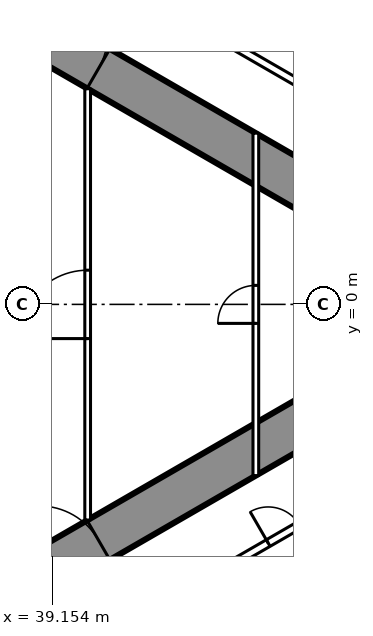
"""IFC4 building model, lengths in metres.
Left out: names, types, materials, properties, quantities, classifications, styles, units other than length and angle.
Written with IfcOpenShell. Run it as: python <this file> out.ifc"""

import sys

from ifc_helpers import new_model, si_unit, direction, frame, frame_2d, origin, place, context, subcontext, project, spatial, rectangle, extrude, element, fill, save


model = new_model("IFC4")
c1 = context("Model", 3, precision=1e-05, world=origin(), true_north=direction((0.0, 1.0)))
c2 = subcontext(c1, "Body", "Model", "MODEL_VIEW")
j1 = project(units=[si_unit("LENGTHUNIT", "METRE"), si_unit("PLANEANGLEUNIT", "RADIAN")], contexts=[c1])
p1 = place(None, origin())
s1 = spatial("IfcSite", under=j1, at=p1, CompositionType="ELEMENT")
p2 = place(p1, origin())
s2 = spatial("IfcBuilding", under=s1, at=p2, CompositionType="ELEMENT")
p3 = place(p2, frame((0.0, 0.0, 233.3)))
s3 = spatial("IfcBuildingStorey", under=s2, at=p3, CompositionType="ELEMENT", Elevation=233.3)
p4 = place(p3, frame((27.2, -13.8, 0.0), z_axis=(0.0, 0.0, 1.0), x_axis=(0.866027159892, 0.499996958321, 0.0)))
e1 = element("IfcWall", 1, at=p4, inside=s3, PredefinedType="SHEAR", context=c2, shape_type="SweptSolid", body=[
    extrude(rectangle(XDim=27.947, YDim=1.2, at=frame_2d((13.973, 0.0))), origin(), (0.0, 0.0, 1.0), 3.6),
])
p5 = place(p4, frame((4.6, 0.0, 0.0)))
e2 = element("IfcOpeningElement", 2, at=p5, cuts=e1, PredefinedType="OPENING", context=c2, shape_type="SweptSolid", body=[
    extrude(rectangle(XDim=1.0, YDim=2.2, at=frame_2d((0.5, 1.1))), frame((0.0, 0.61, 0.0), z_axis=(0.0, -1.0, 0.0), x_axis=(1.0, 0.0, 0.0)), (0.0, 0.0, 1.0), 1.22),
])
p6 = place(p4, frame((13.395, 0.0, 0.0)))
e3 = element("IfcOpeningElement", 3, at=p6, cuts=e1, PredefinedType="OPENING", context=c2, shape_type="SweptSolid", body=[
    extrude(rectangle(XDim=1.8, YDim=2.2, at=frame_2d((0.9, 1.1))), frame((0.0, 0.61, 0.0), z_axis=(0.0, -1.0, 0.0), x_axis=(1.0, 0.0, 0.0)), (0.0, 0.0, 1.0), 1.22),
])
p7 = place(p3, frame((27.2, 13.8, 0.0), z_axis=(0.0, 0.0, 1.0), x_axis=(0.866024515034, -0.500001539357, 0.0)))
e4 = element("IfcWall", 4, at=p7, inside=s3, PredefinedType="SHEAR", context=c2, shape_type="SweptSolid", body=[
    extrude(rectangle(XDim=26.907, YDim=1.2, at=frame_2d((13.454, 0.0))), origin(), (0.0, 0.0, 1.0), 3.6),
])
p8 = place(p7, frame((4.6, 0.0, 0.0)))
e5 = element("IfcOpeningElement", 5, at=p8, cuts=e4, PredefinedType="OPENING", context=c2, shape_type="SweptSolid", body=[
    extrude(rectangle(XDim=1.0, YDim=2.2, at=frame_2d((0.5, 1.1))), frame((0.0, 0.61, 0.0), z_axis=(0.0, -1.0, 0.0), x_axis=(1.0, 0.0, 0.0)), (0.0, 0.0, 1.0), 1.22),
])
p9 = place(p7, frame((13.395, 0.0, 0.0)))
e6 = element("IfcOpeningElement", 6, at=p9, cuts=e4, PredefinedType="OPENING", context=c2, shape_type="SweptSolid", body=[
    extrude(rectangle(XDim=1.8, YDim=2.2, at=frame_2d((0.9, 1.1))), frame((0.0, 0.61, 0.0), z_axis=(0.0, -1.0, 0.0), x_axis=(1.0, 0.0, 0.0)), (0.0, 0.0, 1.0), 1.22),
])
p10 = place(p3, frame((28.959, 15.44, 0.0), z_axis=(0.0, 0.0, 1.0), x_axis=(0.866028936079, -0.499993881836, 0.0)))
e7 = element("IfcWall", 7, at=p10, inside=s3, PredefinedType="PARTITIONING", context=c2, shape_type="SweptSolid", body=[
    extrude(rectangle(XDim=20.503, YDim=0.2, at=frame_2d((10.251, 0.0))), origin(), (0.0, 0.0, 1.0), 3.35),
])
p11 = place(p10, frame((16.137, 0.0, 0.0)))
e8 = element("IfcOpeningElement", 8, at=p11, cuts=e7, PredefinedType="OPENING", context=c2, shape_type="SweptSolid", body=[
    extrude(rectangle(XDim=0.95, YDim=2.2, at=frame_2d((0.475, 1.1))), frame((0.0, 0.11, 0.0), z_axis=(0.0, -1.0, 0.0), x_axis=(1.0, 0.0, 0.0)), (0.0, 0.0, 1.0), 0.22),
])
p12 = place(p10, frame((14.437, 0.0, 0.0)))
e9 = element("IfcOpeningElement", 9, at=p12, cuts=e7, PredefinedType="OPENING", context=c2, shape_type="SweptSolid", body=[
    extrude(rectangle(XDim=0.95, YDim=2.2, at=frame_2d((0.475, 1.1))), frame((0.0, 0.11, 0.0), z_axis=(0.0, -1.0, 0.0), x_axis=(1.0, 0.0, 0.0)), (0.0, 0.0, 1.0), 0.22),
])
p13 = place(p10, frame((2.244, 0.0, 0.0)))
e10 = element("IfcOpeningElement", 10, at=p13, cuts=e7, PredefinedType="OPENING", context=c2, shape_type="SweptSolid", body=[
    extrude(rectangle(XDim=1.8, YDim=2.03, at=frame_2d((0.9, 1.015))), frame((0.0, 0.11, 0.0), z_axis=(0.0, -1.0, 0.0), x_axis=(1.0, 0.0, 0.0)), (0.0, 0.0, 1.0), 0.22),
])
p14 = place(p3, frame((28.959, -15.44, 0.0), z_axis=(0.0, 0.0, 1.0), x_axis=(0.866025204199, 0.500000345692, 0.0)))
e11 = element("IfcWall", 11, at=p14, inside=s3, PredefinedType="PARTITIONING", context=c2, shape_type="SweptSolid", body=[
    extrude(rectangle(XDim=19.646, YDim=0.2, at=frame_2d((9.823, 0.0))), origin(), (0.0, 0.0, 1.0), 3.35),
])
p15 = place(p14, frame((1.494, 0.0, 0.0)))
e12 = element("IfcOpeningElement", 12, at=p15, cuts=e11, PredefinedType="OPENING", context=c2, shape_type="SweptSolid", body=[
    extrude(rectangle(XDim=1.8, YDim=2.03, at=frame_2d((0.9, 1.015))), frame((0.0, 0.11, 0.0), z_axis=(0.0, -1.0, 0.0), x_axis=(1.0, 0.0, 0.0)), (0.0, 0.0, 1.0), 0.22),
])
p16 = place(p14, frame((7.687, 0.0, 0.0)))
e13 = element("IfcOpeningElement", 13, at=p16, cuts=e11, PredefinedType="OPENING", context=c2, shape_type="SweptSolid", body=[
    extrude(rectangle(XDim=1.0, YDim=2.2, at=frame_2d((0.5, 1.1))), frame((0.0, 0.11, 0.0), z_axis=(0.0, -1.0, 0.0), x_axis=(1.0, 0.0, 0.0)), (0.0, 0.0, 1.0), 0.22),
])
p17 = place(p14, frame((18.321, 0.0, 0.0)))
e14 = element("IfcOpeningElement", 14, at=p17, cuts=e11, PredefinedType="OPENING", context=c2, shape_type="SweptSolid", body=[
    extrude(rectangle(XDim=0.95, YDim=2.2, at=frame_2d((0.475, 1.1))), frame((0.0, 0.11, 0.0), z_axis=(0.0, -1.0, 0.0), x_axis=(1.0, 0.0, 0.0)), (0.0, 0.0, 1.0), 0.22),
])
p18 = place(p3, frame((40.075, -5.674, 0.0), z_axis=(0.0, 0.0, 1.0), x_axis=(0.0, 1.0, 0.0)))
e15 = element("IfcWall", 15, at=p18, inside=s3, PredefinedType="PARTITIONING", context=c2, shape_type="SweptSolid", body=[
    extrude(rectangle(XDim=11.348, YDim=0.15, at=frame_2d((5.674, 0.0))), origin(), (0.0, 0.0, 1.0), 3.35),
])
p19 = place(p18, frame((4.774, 0.0, 0.0)))
e16 = element("IfcOpeningElement", 16, at=p19, cuts=e15, PredefinedType="OPENING", context=c2, shape_type="SweptSolid", body=[
    extrude(rectangle(XDim=1.8, YDim=2.2, at=frame_2d((0.9, 1.1))), frame((0.0, 0.085, 0.0), z_axis=(0.0, -1.0, 0.0), x_axis=(1.0, 0.0, 0.0)), (0.0, 0.0, 1.0), 0.17),
])
p20 = place(p3, frame((44.5, -4.505, 0.0), z_axis=(0.0, 0.0, 1.0), x_axis=(0.0, 1.0, 0.0)))
e17 = element("IfcWall", 17, at=p20, inside=s3, PredefinedType="PARTITIONING", context=c2, shape_type="SweptSolid", body=[
    extrude(rectangle(XDim=9.009, YDim=0.15, at=frame_2d((4.505, 0.0))), origin(), (0.0, 0.0, 1.0), 3.35),
])
p21 = place(p20, frame((4.005, 0.0, 0.0)))
e18 = element("IfcOpeningElement", 18, at=p21, cuts=e17, PredefinedType="OPENING", context=c2, shape_type="SweptSolid", body=[
    extrude(rectangle(XDim=1.0, YDim=2.2, at=frame_2d((0.5, 1.1))), frame((0.0, 0.085, 0.0), z_axis=(0.0, -1.0, 0.0), x_axis=(1.0, 0.0, 0.0)), (0.0, 0.0, 1.0), 0.17),
])
p22 = place(p17, origin())
e19 = element("IfcDoor", 19, at=p22, inside=s3, OperationType="SINGLE_SWING_LEFT", PredefinedType="DOOR", context=c2, shape_type="SweptSolid", body=[
    extrude(rectangle(XDim=0.95, YDim=2.2, at=frame_2d((0.475, 1.1))), frame((0.0, 0.025, 0.0), z_axis=(0.0, -1.0, 0.0), x_axis=(1.0, 0.0, 0.0)), (0.0, 0.0, 1.0), 0.05),
])
fill(e14, e19)
p23 = place(p19, origin())
e20 = element("IfcDoor", 20, at=p23, inside=s3, OperationType="DOUBLE_DOOR_SINGLE_SWING", PredefinedType="DOOR", context=c2, shape_type="SweptSolid", body=[
    extrude(rectangle(XDim=1.8, YDim=2.2, at=frame_2d((0.9, 1.1))), frame((0.0, 0.025, 0.0), z_axis=(0.0, -1.0, 0.0), x_axis=(1.0, 0.0, 0.0)), (0.0, 0.0, 1.0), 0.05),
])
fill(e16, e20)
p24 = place(p21, origin())
e21 = element("IfcDoor", 21, at=p24, inside=s3, OperationType="SINGLE_SWING_LEFT", PredefinedType="DOOR", context=c2, shape_type="SweptSolid", body=[
    extrude(rectangle(XDim=1.0, YDim=2.2, at=frame_2d((0.5, 1.1))), frame((0.0, 0.025, 0.0), z_axis=(0.0, -1.0, 0.0), x_axis=(1.0, 0.0, 0.0)), (0.0, 0.0, 1.0), 0.05),
])
fill(e18, e21)
p25 = place(p6, origin())
e22 = element("IfcDoor", 22, at=p25, inside=s3, OperationType="DOUBLE_DOOR_SINGLE_SWING", PredefinedType="DOOR", context=c2, shape_type="SweptSolid", body=[
    extrude(rectangle(XDim=1.8, YDim=2.2, at=frame_2d((0.9, 1.1))), frame((0.0, 0.025, 0.0), z_axis=(0.0, -1.0, 0.0), x_axis=(1.0, 0.0, 0.0)), (0.0, 0.0, 1.0), 0.05),
])
fill(e3, e22)
p26 = place(p9, origin())
e23 = element("IfcDoor", 23, at=p26, inside=s3, OperationType="DOUBLE_DOOR_SINGLE_SWING", PredefinedType="DOOR", context=c2, shape_type="SweptSolid", body=[
    extrude(rectangle(XDim=1.8, YDim=2.2, at=frame_2d((0.9, 1.1))), frame((0.0, 0.025, 0.0), z_axis=(0.0, -1.0, 0.0), x_axis=(1.0, 0.0, 0.0)), (0.0, 0.0, 1.0), 0.05),
])
fill(e6, e23)
save(model, sys.argv[1])
